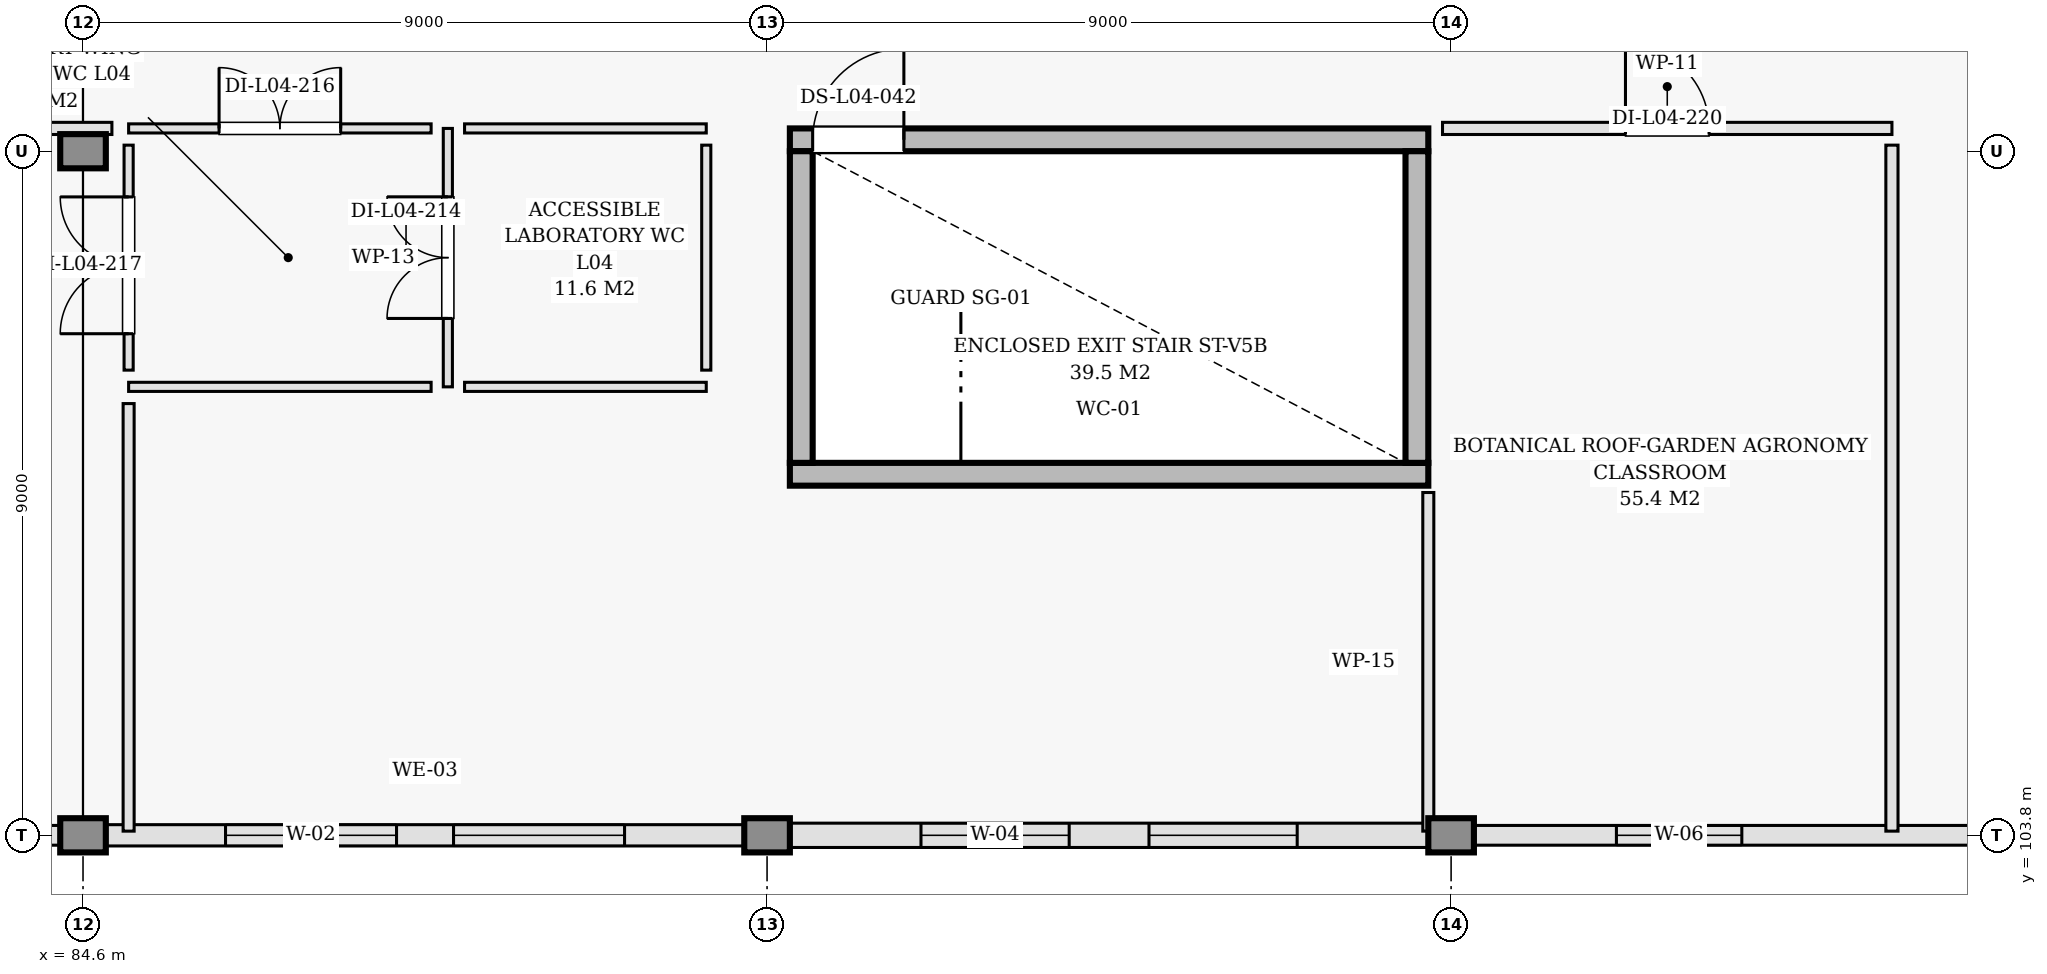
"""IFC4 building model, lengths in metres.
Left out: names, types, materials, properties, quantities, classifications, styles, units other than length and angle.
Written with IfcOpenShell. Run it as: python <this file> out.ifc"""

import sys

from ifc_helpers import new_model, si_unit, direction, frame, frame_2d, origin, origin_2d, place, context, subcontext, project, spatial, rectangle, extrude, element, fill, save


model = new_model("IFC4")
c1 = context("Model", 3, precision=1e-05, world=origin(), true_north=direction((0.0, 1.0)))
c2 = subcontext(c1, "Body", "Model", "MODEL_VIEW")
j1 = project(units=[si_unit("LENGTHUNIT", "METRE"), si_unit("PLANEANGLEUNIT", "RADIAN")], contexts=[c1])
p1 = place(None, origin())
s1 = spatial("IfcSite", under=j1, at=p1, CompositionType="ELEMENT")
p2 = place(p1, origin())
s2 = spatial("IfcBuilding", under=s1, at=p2, CompositionType="ELEMENT")
p3 = place(p2, frame((0.0, 0.0, 18.0)))
s3 = spatial("IfcBuildingStorey", under=s2, at=p3, CompositionType="ELEMENT", Elevation=18.0)
for number, where, z_axis, x_axis in (
    (1, (84.6, 103.8, 0.0), (0.0, 0.0, 1.0), (1.0, 0.0, 0.0)),
    (2, (84.6, 112.8, 0.0), (0.0, 0.0, 1.0), (1.0, 0.0, 0.0)),
    (3, (93.6, 103.8, 0.0), (0.0, 0.0, 1.0), (1.0, 0.0, 0.0)),
    (4, (102.6, 103.8, 0.0), (0.0, 0.0, 1.0), (1.0, 0.0, 0.0)),
):
    element("IfcColumn", number, at=place(p3, frame(where, z_axis=z_axis, x_axis=x_axis)), inside=s3, PredefinedType="COLUMN", context=c2, shape_type="SweptSolid", body=[
        extrude(rectangle(XDim=0.45, YDim=0.45, at=origin_2d()), origin(), (0.0, 0.0, 1.0), 4.2),
    ])
p4 = place(p3, frame((84.06, 103.8, 0.0), z_axis=(0.0, 0.0, 1.0), x_axis=(1.0, 0.0, 0.0)))
e5 = element("IfcWall", 5, at=p4, inside=s3, PredefinedType="SOLIDWALL", context=c2, shape_type="SweptSolid", body=[
    extrude(rectangle(XDim=0.54, YDim=0.26, at=frame_2d((0.27, 0.0))), origin(), (0.0, 0.0, 1.0), 3.94),
])
p5 = place(p3, frame((84.6, 103.8, 0.0), z_axis=(0.0, 0.0, 1.0), x_axis=(1.0, 0.0, 0.0)))
e6 = element("IfcWall", 6, at=p5, inside=s3, PredefinedType="SOLIDWALL", context=c2, shape_type="SweptSolid", body=[
    extrude(rectangle(XDim=9.0, YDim=0.28, at=frame_2d((4.5, 0.0))), origin(), (0.0, 0.0, 1.0), 3.94),
])
p6 = place(p5, frame((1.875, 0.0, 0.95)))
e7 = element("IfcOpeningElement", 7, at=p6, cuts=e6, PredefinedType="OPENING", context=c2, shape_type="SweptSolid", body=[
    extrude(rectangle(XDim=2.25, YDim=1.8, at=frame_2d((1.125, 0.9))), frame((0.0, 0.15, 0.0), z_axis=(0.0, -1.0, 0.0), x_axis=(1.0, 0.0, 0.0)), (0.0, 0.0, 1.0), 0.3),
])
p7 = place(p5, frame((4.875, 0.0, 0.95)))
e8 = element("IfcOpeningElement", 8, at=p7, cuts=e6, PredefinedType="OPENING", context=c2, shape_type="SweptSolid", body=[
    extrude(rectangle(XDim=2.25, YDim=1.8, at=frame_2d((1.125, 0.9))), frame((0.0, 0.15, 0.0), z_axis=(0.0, -1.0, 0.0), x_axis=(1.0, 0.0, 0.0)), (0.0, 0.0, 1.0), 0.3),
])
p8 = place(p3, frame((93.6, 103.8, 0.0), z_axis=(0.0, 0.0, 1.0), x_axis=(1.0, 0.0, 0.0)))
e9 = element("IfcWall", 9, at=p8, inside=s3, PredefinedType="SOLIDWALL", context=c2, shape_type="SweptSolid", body=[
    extrude(rectangle(XDim=9.0, YDim=0.32, at=frame_2d((4.5, 0.0))), origin(), (0.0, 0.0, 1.0), 3.94),
])
p9 = place(p8, frame((2.025, 0.0, 0.95)))
e10 = element("IfcOpeningElement", 10, at=p9, cuts=e9, PredefinedType="OPENING", context=c2, shape_type="SweptSolid", body=[
    extrude(rectangle(XDim=1.95, YDim=1.75, at=frame_2d((0.975, 0.875))), frame((0.0, 0.17, 0.0), z_axis=(0.0, -1.0, 0.0), x_axis=(1.0, 0.0, 0.0)), (0.0, 0.0, 1.0), 0.34),
])
p10 = place(p8, frame((5.025, 0.0, 0.95)))
e11 = element("IfcOpeningElement", 11, at=p10, cuts=e9, PredefinedType="OPENING", context=c2, shape_type="SweptSolid", body=[
    extrude(rectangle(XDim=1.95, YDim=1.75, at=frame_2d((0.975, 0.875))), frame((0.0, 0.17, 0.0), z_axis=(0.0, -1.0, 0.0), x_axis=(1.0, 0.0, 0.0)), (0.0, 0.0, 1.0), 0.34),
])
p11 = place(p3, frame((102.6, 103.8, 0.0), z_axis=(0.0, 0.0, 1.0), x_axis=(1.0, 0.0, 0.0)))
e12 = element("IfcWall", 12, at=p11, inside=s3, PredefinedType="SOLIDWALL", context=c2, shape_type="SweptSolid", body=[
    extrude(rectangle(XDim=9.0, YDim=0.26, at=frame_2d((4.5, 0.0))), origin(), (0.0, 0.0, 1.0), 3.94),
])
p12 = place(p11, frame((2.175, 0.0, 0.95)))
e13 = element("IfcOpeningElement", 13, at=p12, cuts=e12, PredefinedType="OPENING", context=c2, shape_type="SweptSolid", body=[
    extrude(rectangle(XDim=1.65, YDim=1.7, at=frame_2d((0.825, 0.85))), frame((0.0, 0.14, 0.0), z_axis=(0.0, -1.0, 0.0), x_axis=(1.0, 0.0, 0.0)), (0.0, 0.0, 1.0), 0.28),
])
p13 = place(p3, frame((93.9, 108.55, 0.0), z_axis=(0.0, 0.0, 1.0), x_axis=(1.0, 0.0, 0.0)))
e14 = element("IfcWall", 14, at=p13, inside=s3, PredefinedType="SHEAR", context=c2, shape_type="SweptSolid", body=[
    extrude(rectangle(XDim=8.4, YDim=0.3, at=frame_2d((4.2, 0.0))), origin(), (0.0, 0.0, 1.0), 4.0),
])
p14 = place(p3, frame((93.9, 112.95, 0.0), z_axis=(0.0, 0.0, 1.0), x_axis=(1.0, 0.0, 0.0)))
e15 = element("IfcWall", 15, at=p14, inside=s3, PredefinedType="SHEAR", context=c2, shape_type="SweptSolid", body=[
    extrude(rectangle(XDim=8.4, YDim=0.3, at=frame_2d((4.2, 0.0))), origin(), (0.0, 0.0, 1.0), 4.0),
])
p15 = place(p14, frame((0.3, 0.0, 0.0)))
e16 = element("IfcOpeningElement", 16, at=p15, cuts=e15, PredefinedType="OPENING", context=c2, shape_type="SweptSolid", body=[
    extrude(rectangle(XDim=1.2, YDim=2.15, at=frame_2d((0.6, 1.075))), frame((0.0, 0.16, 0.0), z_axis=(0.0, -1.0, 0.0), x_axis=(1.0, 0.0, 0.0)), (0.0, 0.0, 1.0), 0.32),
])
for number, where, z_axis, x_axis in (
    (17, (94.05, 108.7, 0.0), (0.0, 0.0, 1.0), (0.0, 1.0, 0.0)),
    (18, (102.15, 108.7, 0.0), (0.0, 0.0, 1.0), (0.0, 1.0, 0.0)),
):
    element("IfcWall", number, at=place(p3, frame(where, z_axis=z_axis, x_axis=x_axis)), inside=s3, PredefinedType="SHEAR", context=c2, shape_type="SweptSolid", body=[
        extrude(rectangle(XDim=4.1, YDim=0.3, at=frame_2d((2.05, 0.0))), origin(), (0.0, 0.0, 1.0), 4.0),
    ])
p16 = place(p3, frame((89.4, 109.7, 0.0), z_axis=(0.0, 0.0, 1.0), x_axis=(0.0, 1.0, 0.0)))
e19 = element("IfcWall", 19, at=p16, inside=s3, PredefinedType="PARTITIONING", context=c2, shape_type="SweptSolid", body=[
    extrude(rectangle(XDim=3.4, YDim=0.12, at=frame_2d((1.7, 0.0))), origin(), (0.0, 0.0, 1.0), 3.94),
])
p17 = place(p16, frame((0.9, 0.0, 0.0)))
e20 = element("IfcOpeningElement", 20, at=p17, cuts=e19, PredefinedType="OPENING", context=c2, shape_type="SweptSolid", body=[
    extrude(rectangle(XDim=1.6, YDim=2.2, at=frame_2d((0.8, 1.1))), frame((0.0, 0.07, 0.0), z_axis=(0.0, -1.0, 0.0), x_axis=(1.0, 0.0, 0.0)), (0.0, 0.0, 1.0), 0.14),
])
for number, where, z_axis, x_axis in (
    (21, (89.62, 109.7, 0.0), (0.0, 0.0, 1.0), (1.0, 0.0, 0.0)),
    (22, (89.62, 113.1, 0.0), (0.0, 0.0, 1.0), (1.0, 0.0, 0.0)),
):
    element("IfcWall", number, at=place(p3, frame(where, z_axis=z_axis, x_axis=x_axis)), inside=s3, PredefinedType="PARTITIONING", context=c2, shape_type="SweptSolid", body=[
        extrude(rectangle(XDim=3.18, YDim=0.12, at=frame_2d((1.59, 0.0))), origin(), (0.0, 0.0, 1.0), 3.94),
    ])
p18 = place(p3, frame((92.8, 109.92, 0.0), z_axis=(0.0, 0.0, 1.0), x_axis=(0.0, 1.0, 0.0)))
e23 = element("IfcWall", 23, at=p18, inside=s3, PredefinedType="PARTITIONING", context=c2, shape_type="SweptSolid", body=[
    extrude(rectangle(XDim=2.96, YDim=0.12, at=frame_2d((1.48, 0.0))), origin(), (0.0, 0.0, 1.0), 3.94),
])
p19 = place(p3, frame((85.2, 113.1, 0.0), z_axis=(0.0, 0.0, 1.0), x_axis=(1.0, 0.0, 0.0)))
e24 = element("IfcWall", 24, at=p19, inside=s3, PredefinedType="PARTITIONING", context=c2, shape_type="SweptSolid", body=[
    extrude(rectangle(XDim=3.98, YDim=0.12, at=frame_2d((1.99, 0.0))), origin(), (0.0, 0.0, 1.0), 3.94),
])
p20 = place(p19, frame((1.19, 0.0, 0.0)))
e25 = element("IfcOpeningElement", 25, at=p20, cuts=e24, PredefinedType="OPENING", context=c2, shape_type="SweptSolid", body=[
    extrude(rectangle(XDim=1.6, YDim=2.2, at=frame_2d((0.8, 1.1))), frame((0.0, 0.07, 0.0), z_axis=(0.0, -1.0, 0.0), x_axis=(1.0, 0.0, 0.0)), (0.0, 0.0, 1.0), 0.14),
])
p21 = place(p3, frame((85.2, 109.7, 0.0), z_axis=(0.0, 0.0, 1.0), x_axis=(1.0, 0.0, 0.0)))
e26 = element("IfcWall", 26, at=p21, inside=s3, PredefinedType="PARTITIONING", context=c2, shape_type="SweptSolid", body=[
    extrude(rectangle(XDim=3.98, YDim=0.12, at=frame_2d((1.99, 0.0))), origin(), (0.0, 0.0, 1.0), 3.94),
])
p22 = place(p3, frame((85.2, 109.92, 0.0), z_axis=(0.0, 0.0, 1.0), x_axis=(0.0, 1.0, 0.0)))
e27 = element("IfcWall", 27, at=p22, inside=s3, PredefinedType="PARTITIONING", context=c2, shape_type="SweptSolid", body=[
    extrude(rectangle(XDim=2.96, YDim=0.12, at=frame_2d((1.48, 0.0))), origin(), (0.0, 0.0, 1.0), 3.94),
])
p23 = place(p22, frame((0.479, 0.0, 0.0)))
e28 = element("IfcOpeningElement", 28, at=p23, cuts=e27, PredefinedType="OPENING", context=c2, shape_type="SweptSolid", body=[
    extrude(rectangle(XDim=1.8, YDim=2.2, at=frame_2d((0.9, 1.1))), frame((0.0, 0.07, 0.0), z_axis=(0.0, -1.0, 0.0), x_axis=(1.0, 0.0, 0.0)), (0.0, 0.0, 1.0), 0.14),
])
p24 = place(p3, frame((102.487, 113.1, 0.0), z_axis=(0.0, 0.0, 1.0), x_axis=(1.0, 0.0, 0.0)))
e29 = element("IfcWall", 29, at=p24, inside=s3, PredefinedType="PARTITIONING", context=c2, shape_type="SweptSolid", body=[
    extrude(rectangle(XDim=5.913, YDim=0.16, at=frame_2d((2.957, 0.0))), origin(), (0.0, 0.0, 1.0), 3.94),
])
p25 = place(p24, frame((2.407, 0.0, 0.0)))
e30 = element("IfcOpeningElement", 30, at=p25, cuts=e29, PredefinedType="OPENING", context=c2, shape_type="SweptSolid", body=[
    extrude(rectangle(XDim=1.1, YDim=2.15, at=frame_2d((0.55, 1.075))), frame((0.0, 0.09, 0.0), z_axis=(0.0, -1.0, 0.0), x_axis=(1.0, 0.0, 0.0)), (0.0, 0.0, 1.0), 0.18),
])
p26 = place(p3, frame((108.4, 103.855, 0.0), z_axis=(0.0, 0.0, 1.0), x_axis=(0.0, 1.0, 0.0)))
e31 = element("IfcWall", 31, at=p26, inside=s3, PredefinedType="PARTITIONING", context=c2, shape_type="SweptSolid", body=[
    extrude(rectangle(XDim=9.025, YDim=0.16, at=frame_2d((4.512, 0.0))), origin(), (0.0, 0.0, 1.0), 3.94),
])
p27 = place(p3, frame((102.3, 103.855, 0.0), z_axis=(0.0, 0.0, 1.0), x_axis=(0.0, 1.0, 0.0)))
e32 = element("IfcWall", 32, at=p27, inside=s3, PredefinedType="PARTITIONING", context=c2, shape_type="SweptSolid", body=[
    extrude(rectangle(XDim=4.455, YDim=0.145, at=frame_2d((2.228, 0.0))), origin(), (0.0, 0.0, 1.0), 3.94),
])
p28 = place(p3, frame((80.146, 113.1, 0.0), z_axis=(0.0, 0.0, 1.0), x_axis=(1.0, 0.0, 0.0)))
e33 = element("IfcWall", 33, at=p28, inside=s3, PredefinedType="PARTITIONING", context=c2, shape_type="SweptSolid", body=[
    extrude(rectangle(XDim=4.834, YDim=0.16, at=frame_2d((2.417, 0.0))), origin(), (0.0, 0.0, 1.0), 3.94),
])
p29 = place(p3, frame((85.2, 103.855, 0.0), z_axis=(0.0, 0.0, 1.0), x_axis=(0.0, 1.0, 0.0)))
e34 = element("IfcWall", 34, at=p29, inside=s3, PredefinedType="PARTITIONING", context=c2, shape_type="SweptSolid", body=[
    extrude(rectangle(XDim=5.625, YDim=0.145, at=frame_2d((2.812, 0.0))), origin(), (0.0, 0.0, 1.0), 3.94),
])
p30 = place(p6, origin())
e35 = element("IfcWindow", 35, at=p30, inside=s3, PartitioningType="DOUBLE_PANEL_VERTICAL", PredefinedType="WINDOW", context=c2, shape_type="SweptSolid", body=[
    extrude(rectangle(XDim=2.25, YDim=1.8, at=frame_2d((1.125, 0.9))), frame((0.0, 0.03, 0.0), z_axis=(0.0, -1.0, 0.0), x_axis=(1.0, 0.0, 0.0)), (0.0, 0.0, 1.0), 0.06),
])
fill(e7, e35)
p31 = place(p7, origin())
e36 = element("IfcWindow", 36, at=p31, inside=s3, PartitioningType="DOUBLE_PANEL_VERTICAL", PredefinedType="WINDOW", context=c2, shape_type="SweptSolid", body=[
    extrude(rectangle(XDim=2.25, YDim=1.8, at=frame_2d((1.125, 0.9))), frame((0.0, 0.03, 0.0), z_axis=(0.0, -1.0, 0.0), x_axis=(1.0, 0.0, 0.0)), (0.0, 0.0, 1.0), 0.06),
])
fill(e8, e36)
p32 = place(p9, origin())
e37 = element("IfcWindow", 37, at=p32, inside=s3, PartitioningType="DOUBLE_PANEL_VERTICAL", PredefinedType="WINDOW", context=c2, shape_type="SweptSolid", body=[
    extrude(rectangle(XDim=1.95, YDim=1.75, at=frame_2d((0.975, 0.875))), frame((0.0, 0.03, 0.0), z_axis=(0.0, -1.0, 0.0), x_axis=(1.0, 0.0, 0.0)), (0.0, 0.0, 1.0), 0.06),
])
fill(e10, e37)
p33 = place(p10, origin())
e38 = element("IfcWindow", 38, at=p33, inside=s3, PartitioningType="DOUBLE_PANEL_VERTICAL", PredefinedType="WINDOW", context=c2, shape_type="SweptSolid", body=[
    extrude(rectangle(XDim=1.95, YDim=1.75, at=frame_2d((0.975, 0.875))), frame((0.0, 0.03, 0.0), z_axis=(0.0, -1.0, 0.0), x_axis=(1.0, 0.0, 0.0)), (0.0, 0.0, 1.0), 0.06),
])
fill(e11, e38)
p34 = place(p12, origin())
e39 = element("IfcWindow", 39, at=p34, inside=s3, PartitioningType="DOUBLE_PANEL_VERTICAL", PredefinedType="WINDOW", context=c2, shape_type="SweptSolid", body=[
    extrude(rectangle(XDim=1.65, YDim=1.7, at=frame_2d((0.825, 0.85))), frame((0.0, 0.03, 0.0), z_axis=(0.0, -1.0, 0.0), x_axis=(1.0, 0.0, 0.0)), (0.0, 0.0, 1.0), 0.06),
])
fill(e13, e39)
p35 = place(p15, origin())
e40 = element("IfcDoor", 40, at=p35, inside=s3, OperationType="SINGLE_SWING_RIGHT", PredefinedType="DOOR", context=c2, shape_type="SweptSolid", body=[
    extrude(rectangle(XDim=1.2, YDim=2.15, at=frame_2d((0.6, 1.075))), frame((0.0, 0.025, 0.0), z_axis=(0.0, -1.0, 0.0), x_axis=(1.0, 0.0, 0.0)), (0.0, 0.0, 1.0), 0.05),
])
fill(e16, e40)
p36 = place(p17, origin())
e41 = element("IfcDoor", 41, at=p36, inside=s3, OperationType="DOUBLE_DOOR_SINGLE_SWING", PredefinedType="DOOR", context=c2, shape_type="SweptSolid", body=[
    extrude(rectangle(XDim=1.6, YDim=2.2, at=frame_2d((0.8, 1.1))), frame((0.0, 0.025, 0.0), z_axis=(0.0, -1.0, 0.0), x_axis=(1.0, 0.0, 0.0)), (0.0, 0.0, 1.0), 0.05),
])
fill(e20, e41)
p37 = place(p20, origin())
e42 = element("IfcDoor", 42, at=p37, inside=s3, OperationType="DOUBLE_DOOR_SINGLE_SWING", PredefinedType="DOOR", context=c2, shape_type="SweptSolid", body=[
    extrude(rectangle(XDim=1.6, YDim=2.2, at=frame_2d((0.8, 1.1))), frame((0.0, 0.025, 0.0), z_axis=(0.0, -1.0, 0.0), x_axis=(1.0, 0.0, 0.0)), (0.0, 0.0, 1.0), 0.05),
])
fill(e25, e42)
p38 = place(p23, origin())
e43 = element("IfcDoor", 43, at=p38, inside=s3, OperationType="DOUBLE_DOOR_SINGLE_SWING", PredefinedType="DOOR", context=c2, shape_type="SweptSolid", body=[
    extrude(rectangle(XDim=1.8, YDim=2.2, at=frame_2d((0.9, 1.1))), frame((0.0, 0.025, 0.0), z_axis=(0.0, -1.0, 0.0), x_axis=(1.0, 0.0, 0.0)), (0.0, 0.0, 1.0), 0.05),
])
fill(e28, e43)
p39 = place(p25, origin())
e44 = element("IfcDoor", 44, at=p39, inside=s3, OperationType="SINGLE_SWING_LEFT", PredefinedType="DOOR", context=c2, shape_type="SweptSolid", body=[
    extrude(rectangle(XDim=1.1, YDim=2.15, at=frame_2d((0.55, 1.075))), frame((0.0, 0.025, 0.0), z_axis=(0.0, -1.0, 0.0), x_axis=(1.0, 0.0, 0.0)), (0.0, 0.0, 1.0), 0.05),
])
fill(e30, e44)
save(model, sys.argv[1])
